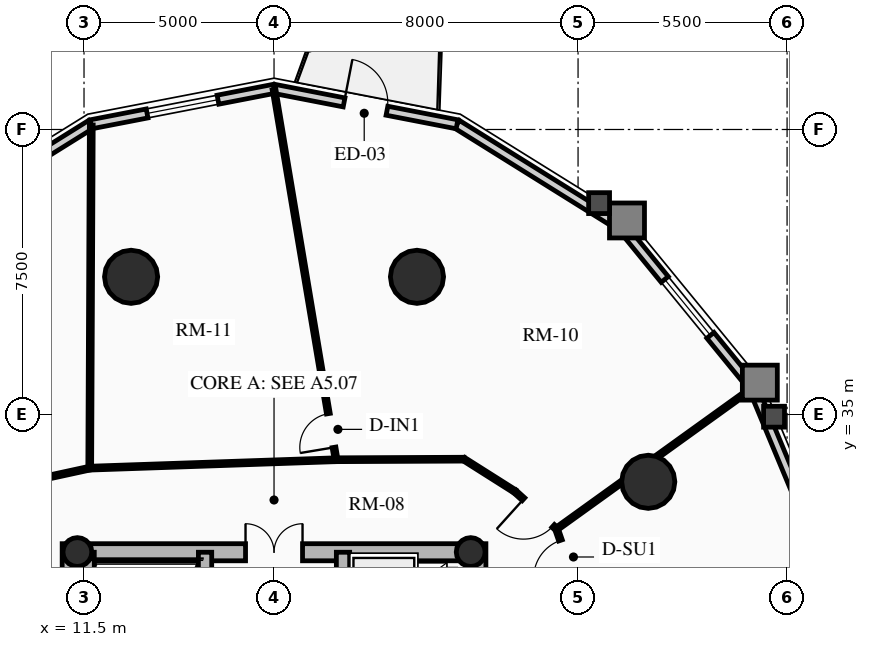
"""IFC4 building model, lengths in metres.
Left out: names, types, materials, properties, quantities, classifications, styles, units other than length and angle.
Written with IfcOpenShell. Run it as: python <this file> out.ifc"""

import sys

from ifc_helpers import new_model, si_unit, direction, frame, frame_2d, origin, origin_2d, place, context, subcontext, project, spatial, rectangle, circle, hollow_circle, extrude, source, transform, mapped, element, fill, save


model = new_model("IFC4")
c1 = context("Model", 3, precision=1e-05, world=origin(), true_north=direction((0.0, 1.0)))
c2 = subcontext(c1, "Body", "Model", "MODEL_VIEW")
j1 = project(units=[si_unit("LENGTHUNIT", "METRE"), si_unit("PLANEANGLEUNIT", "RADIAN")], contexts=[c1])
p1 = place(None, origin())
s1 = spatial("IfcSite", under=j1, at=p1, CompositionType="ELEMENT")
p2 = place(p1, origin())
s2 = spatial("IfcBuilding", under=s1, at=p2, CompositionType="ELEMENT")
p3 = place(p2, frame((0.0, 0.0, 102.16)))
s3 = spatial("IfcBuildingStorey", under=s2, at=p3, CompositionType="ELEMENT", Elevation=102.16)
for number, where, z_axis, x_axis in (
    (1, (11.15, 17.4, 0.0), (0.0, 0.0, 1.0), (0.0, 1.0, 0.0)),
    (2, (21.85, 17.4, 0.0), (0.0, 0.0, 1.0), (0.0, 1.0, 0.0)),
):
    element("IfcWall", number, at=place(p3, frame(where, z_axis=z_axis, x_axis=x_axis)), inside=s3, PredefinedType="SHEAR", context=c2, shape_type="SweptSolid", body=[
        extrude(rectangle(XDim=14.2, YDim=0.45, at=frame_2d((7.1, 0.0))), origin(), (0.0, 0.0, 1.0), 2.91),
    ])
p4 = place(p3, frame((11.15, 31.375, 0.0), z_axis=(0.0, 0.0, 1.0), x_axis=(1.0, 0.0, 0.0)))
e3 = element("IfcWall", 3, at=p4, inside=s3, PredefinedType="SHEAR", context=c2, shape_type="SweptSolid", body=[
    extrude(rectangle(XDim=10.7, YDim=0.45, at=frame_2d((5.35, 0.0))), origin(), (0.0, 0.0, 1.0), 2.91),
])
m1 = source(origin(), c2, "Body", "SweptSolid", [
    extrude(rectangle(XDim=1.5, YDim=2.02, at=frame_2d((0.75, 1.01))), frame((0.0, 0.235, 0.0), z_axis=(0.0, -1.0, 0.0), x_axis=(1.0, 0.0, 0.0)), (0.0, 0.0, 1.0), 0.47),
])
p5 = place(p4, frame((4.6, 0.0, 0.0)))
e4 = element("IfcOpeningElement", 4, at=p5, cuts=e3, PredefinedType="OPENING", context=c2, shape_type="MappedRepresentation", body=[
    mapped(m1, transform((0.0, 0.0, 0.0), x_axis=(1.0, 0.0, 0.0), y_axis=(0.0, 1.0, 0.0), z_axis=(0.0, 0.0, 1.0), scale=1.0)),
])
p6 = place(p3, frame((14.685, 17.625, 0.0), z_axis=(0.0, 0.0, 1.0), x_axis=(0.0, 1.0, 0.0)))
e5 = element("IfcWall", 5, at=p6, inside=s3, PredefinedType="SHEAR", context=c2, shape_type="SweptSolid", body=[
    extrude(rectangle(XDim=13.75, YDim=0.35, at=frame_2d((6.875, 0.0))), origin(), (0.0, 0.0, 1.0), 2.91),
])
m2 = source(origin(), c2, "Body", "SweptSolid", [
    extrude(rectangle(XDim=1.1, YDim=2.015, at=frame_2d((0.55, 1.007))), frame((0.0, 0.185, 0.0), z_axis=(0.0, -1.0, 0.0), x_axis=(1.0, 0.0, 0.0)), (0.0, 0.0, 1.0), 0.37),
])
p7 = place(p6, frame((4.875, 0.0, 0.0)))
e6 = element("IfcOpeningElement", 6, at=p7, cuts=e5, PredefinedType="OPENING", context=c2, shape_type="MappedRepresentation", body=[
    mapped(m2, transform((0.0, 0.0, 0.0), x_axis=(1.0, 0.0, 0.0), y_axis=(0.0, 1.0, 0.0), z_axis=(0.0, 0.0, 1.0), scale=1.0)),
])
m3 = source(origin(), c2, "Body", "SweptSolid", [
    extrude(rectangle(XDim=1.15, YDim=2.02, at=frame_2d((0.575, 1.01))), frame((0.0, 0.185, 0.0), z_axis=(0.0, -1.0, 0.0), x_axis=(1.0, 0.0, 0.0)), (0.0, 0.0, 1.0), 0.37),
])
p8 = place(p6, frame((7.295, 0.0, 0.0)))
e7 = element("IfcOpeningElement", 7, at=p8, cuts=e5, PredefinedType="OPENING", context=c2, shape_type="MappedRepresentation", body=[
    mapped(m3, transform((0.0, 0.0, 0.0), x_axis=(1.0, 0.0, 0.0), y_axis=(0.0, 1.0, 0.0), z_axis=(0.0, 0.0, 1.0), scale=1.0)),
])
p9 = place(p3, frame((18.315, 17.625, 0.0), z_axis=(0.0, 0.0, 1.0), x_axis=(0.0, 1.0, 0.0)))
e8 = element("IfcWall", 8, at=p9, inside=s3, PredefinedType="SHEAR", context=c2, shape_type="SweptSolid", body=[
    extrude(rectangle(XDim=13.75, YDim=0.35, at=frame_2d((6.875, 0.0))), origin(), (0.0, 0.0, 1.0), 2.91),
])
p10 = place(p9, frame((10.0, 0.0, 0.0)))
e9 = element("IfcOpeningElement", 9, at=p10, cuts=e8, PredefinedType="OPENING", context=c2, shape_type="MappedRepresentation", body=[
    mapped(m2, transform((0.0, 0.0, 0.0), x_axis=(1.0, 0.0, 0.0), y_axis=(0.0, 1.0, 0.0), z_axis=(0.0, 0.0, 1.0), scale=1.0)),
])
p11 = place(p9, frame((12.0, 0.0, 0.0)))
e10 = element("IfcOpeningElement", 10, at=p11, cuts=e8, PredefinedType="OPENING", context=c2, shape_type="MappedRepresentation", body=[
    mapped(m2, transform((0.0, 0.0, 0.0), x_axis=(1.0, 0.0, 0.0), y_axis=(0.0, 1.0, 0.0), z_axis=(0.0, 0.0, 1.0), scale=1.0)),
])
p12 = place(p9, frame((5.305, 0.0, 0.0)))
e11 = element("IfcOpeningElement", 11, at=p12, cuts=e8, PredefinedType="OPENING", context=c2, shape_type="MappedRepresentation", body=[
    mapped(m3, transform((0.0, 0.0, 0.0), x_axis=(1.0, 0.0, 0.0), y_axis=(0.0, 1.0, 0.0), z_axis=(0.0, 0.0, 1.0), scale=1.0)),
])
p13 = place(p3, frame((11.595, 24.655, 0.0), z_axis=(0.0, 0.0, 1.0), x_axis=(0.0, 1.0, 0.0)))
e12 = element("IfcWall", 12, at=p13, inside=s3, PredefinedType="SHEAR", context=c2, shape_type="SweptSolid", body=[
    extrude(rectangle(XDim=6.72, YDim=0.35, at=frame_2d((3.36, 0.0))), origin(), (0.0, 0.0, 1.0), 2.91),
])
for number, where, z_axis, x_axis in (
    (13, (11.325, 31.38, 0.0), (0.0, 0.0, 1.0), (1.0, 0.0, 0.0)),
    (14, (21.675, 31.38, 0.0), (0.0, 0.0, 1.0), (1.0, 0.0, 0.0)),
):
    element("IfcColumn", number, at=place(p3, frame(where, z_axis=z_axis, x_axis=x_axis)), inside=s3, PredefinedType="COLUMN", context=c2, shape_type="SweptSolid", body=[
        extrude(hollow_circle(Radius=0.38, WallThickness=0.032, at=origin_2d()), origin(), (0.0, 0.0, 1.0), 2.91),
    ])
for number, where, z_axis, x_axis in (
    (15, (26.347, 33.229, 0.0), (0.0, 0.0, 1.0), (1.0, 0.0, 0.0)),
    (16, (20.261, 38.623, 0.0), (0.0, 0.0, 1.0), (1.0, 0.0, 0.0)),
    (17, (12.739, 38.623, 0.0), (0.0, 0.0, 1.0), (1.0, 0.0, 0.0)),
):
    element("IfcColumn", number, at=place(p3, frame(where, z_axis=z_axis, x_axis=x_axis)), inside=s3, PredefinedType="USERDEFINED", context=c2, shape_type="SweptSolid", body=[
        extrude(circle(Radius=0.7, at=origin_2d()), origin(), (0.0, 0.0, 1.0), 2.91),
    ])
p14 = place(p3, frame((29.105, 35.709, 0.0), z_axis=(0.0, 0.0, 1.0), x_axis=(0.384344417632, -0.923189779317, 0.0)))
e18 = element("IfcWall", 18, at=p14, inside=s3, PredefinedType="SOLIDWALL", context=c2, shape_type="SweptSolid", body=[
    extrude(rectangle(XDim=5.758, YDim=0.24, at=frame_2d((2.879, 0.0))), origin(), (0.0, 0.0, 1.0), 2.179),
])
p15 = place(p3, frame((25.658, 39.928, 0.0), z_axis=(0.0, 0.0, 1.0), x_axis=(0.632700781152, -0.77439635945, 0.0)))
e19 = element("IfcWall", 19, at=p15, inside=s3, PredefinedType="SOLIDWALL", context=c2, shape_type="SweptSolid", body=[
    extrude(rectangle(XDim=5.448, YDim=0.24, at=frame_2d((2.724, 0.0))), origin(), (0.0, 0.0, 1.0), 2.179),
])
m4 = source(origin(), c2, "Body", "SweptSolid", [
    extrude(rectangle(XDim=1.9, YDim=1.35, at=frame_2d((0.95, 0.675))), frame((0.0, 0.13, 0.0), z_axis=(0.0, -1.0, 0.0), x_axis=(1.0, 0.0, 0.0)), (0.0, 0.0, 1.0), 0.26),
])
p16 = place(p15, frame((1.774, 0.0, 0.65)))
e20 = element("IfcOpeningElement", 20, at=p16, cuts=e19, PredefinedType="OPENING", context=c2, shape_type="MappedRepresentation", body=[
    mapped(m4, transform((0.0, 0.0, 0.0), x_axis=(1.0, 0.0, 0.0), y_axis=(0.0, 1.0, 0.0), z_axis=(0.0, 0.0, 1.0), scale=1.0)),
])
p17 = place(p3, frame((21.315, 42.637, 0.0), z_axis=(0.0, 0.0, 1.0), x_axis=(0.848520380187, -0.529162701263, 0.0)))
e21 = element("IfcWall", 21, at=p17, inside=s3, PredefinedType="SOLIDWALL", context=c2, shape_type="SweptSolid", body=[
    extrude(rectangle(XDim=5.119, YDim=0.24, at=frame_2d((2.56, 0.0))), origin(), (0.0, 0.0, 1.0), 2.179),
])
p18 = place(p3, frame((16.5, 43.57, 0.0), z_axis=(0.0, 0.0, 1.0), x_axis=(0.981723785992, -0.190311344954, 0.0)))
e22 = element("IfcWall", 22, at=p18, inside=s3, PredefinedType="SOLIDWALL", context=c2, shape_type="SweptSolid", body=[
    extrude(rectangle(XDim=4.904, YDim=0.24, at=frame_2d((2.452, 0.0))), origin(), (0.0, 0.0, 1.0), 2.179),
])
m5 = source(origin(), c2, "Body", "SweptSolid", [
    extrude(rectangle(XDim=1.15, YDim=2.005, at=frame_2d((0.575, 1.002))), frame((0.0, 0.13, 0.0), z_axis=(0.0, -1.0, 0.0), x_axis=(1.0, 0.0, 0.0)), (0.0, 0.0, 1.0), 0.26),
])
p19 = place(p18, frame((1.877, 0.0, 0.0)))
e23 = element("IfcOpeningElement", 23, at=p19, cuts=e22, PredefinedType="OPENING", context=c2, shape_type="MappedRepresentation", body=[
    mapped(m5, transform((0.0, 0.0, 0.0), x_axis=(1.0, 0.0, 0.0), y_axis=(0.0, 1.0, 0.0), z_axis=(0.0, 0.0, 1.0), scale=1.0)),
])
p20 = place(p3, frame((11.685, 42.637, 0.0), z_axis=(0.0, 0.0, 1.0), x_axis=(0.981723785992, 0.190311344954, 0.0)))
e24 = element("IfcWall", 24, at=p20, inside=s3, PredefinedType="SOLIDWALL", context=c2, shape_type="SweptSolid", body=[
    extrude(rectangle(XDim=4.904, YDim=0.24, at=frame_2d((2.452, 0.0))), origin(), (0.0, 0.0, 1.0), 2.179),
])
p21 = place(p20, frame((1.502, 0.0, 0.65)))
e25 = element("IfcOpeningElement", 25, at=p21, cuts=e24, PredefinedType="OPENING", context=c2, shape_type="MappedRepresentation", body=[
    mapped(m4, transform((0.0, 0.0, 0.0), x_axis=(1.0, 0.0, 0.0), y_axis=(0.0, 1.0, 0.0), z_axis=(0.0, 0.0, 1.0), scale=1.0)),
])
p22 = place(p3, frame((7.342, 39.928, 0.0), z_axis=(0.0, 0.0, 1.0), x_axis=(0.848520380187, 0.529162701263, 0.0)))
e26 = element("IfcWall", 26, at=p22, inside=s3, PredefinedType="SOLIDWALL", context=c2, shape_type="SweptSolid", body=[
    extrude(rectangle(XDim=5.119, YDim=0.24, at=frame_2d((2.56, 0.0))), origin(), (0.0, 0.0, 1.0), 2.179),
])
p23 = place(p3, frame((24.42, 30.582, 0.0), z_axis=(0.0, 0.0, 1.0), x_axis=(-0.327437665675, 0.944872782494, 0.0)))
e27 = element("IfcWall", 27, at=p23, inside=s3, PredefinedType="MOVABLE", context=c2, shape_type="SweptSolid", body=[
    extrude(rectangle(XDim=1.487, YDim=0.1, at=frame_2d((0.743, 0.0))), origin(), (0.0, 0.0, 1.0), 2.225),
])
m6 = source(origin(), c2, "Body", "SweptSolid", [
    extrude(rectangle(XDim=1.05, YDim=2.015, at=frame_2d((0.525, 1.007))), frame((0.0, 0.06, 0.0), z_axis=(0.0, -1.0, 0.0), x_axis=(1.0, 0.0, 0.0)), (0.0, 0.0, 1.0), 0.12),
])
p24 = place(p23, frame((0.12, 0.0, 0.0)))
e28 = element("IfcOpeningElement", 28, at=p24, cuts=e27, PredefinedType="OPENING", context=c2, shape_type="MappedRepresentation", body=[
    mapped(m6, transform((0.0, 0.0, 0.0), x_axis=(1.0, 0.0, 0.0), y_axis=(0.0, 1.0, 0.0), z_axis=(0.0, 0.0, 1.0), scale=1.0)),
])
p25 = place(p3, frame((23.933, 31.987, 0.0), z_axis=(0.0, 0.0, 1.0), x_axis=(-0.742471347264, 0.669877823556, 0.0)))
e29 = element("IfcWall", 29, at=p25, inside=s3, PredefinedType="MOVABLE", context=c2, shape_type="SweptSolid", body=[
    extrude(rectangle(XDim=1.476, YDim=0.1, at=frame_2d((0.738, 0.0))), origin(), (0.0, 0.0, 1.0), 2.225),
])
p26 = place(p25, frame((0.12, 0.0, 0.0)))
e30 = element("IfcOpeningElement", 30, at=p26, cuts=e29, PredefinedType="OPENING", context=c2, shape_type="MappedRepresentation", body=[
    mapped(m6, transform((0.0, 0.0, 0.0), x_axis=(1.0, 0.0, 0.0), y_axis=(0.0, 1.0, 0.0), z_axis=(0.0, 0.0, 1.0), scale=1.0)),
])
p27 = place(p3, frame((22.837, 32.976, 0.0), z_axis=(0.0, 0.0, 1.0), x_axis=(-0.844976677144, 0.534803155454, 0.0)))
e31 = element("IfcWall", 31, at=p27, inside=s3, PredefinedType="MOVABLE", context=c2, shape_type="SweptSolid", body=[
    extrude(rectangle(XDim=1.587, YDim=0.1, at=frame_2d((0.793, 0.0))), origin(), (0.0, 0.0, 1.0), 2.225),
])
p28 = place(p3, frame((21.496, 33.824, 0.0), z_axis=(0.0, 0.0, 1.0), x_axis=(-0.999990516754, -0.004355043261, 0.0)))
e32 = element("IfcWall", 32, at=p28, inside=s3, PredefinedType="MOVABLE", context=c2, shape_type="SweptSolid", body=[
    extrude(rectangle(XDim=3.364, YDim=0.1, at=frame_2d((1.682, 0.0))), origin(), (0.0, 0.0, 1.0), 2.225),
])
p29 = place(p3, frame((18.133, 33.81, 0.0), z_axis=(0.0, 0.0, 1.0), x_axis=(-0.999415793323, -0.03417706916, 0.0)))
e33 = element("IfcWall", 33, at=p29, inside=s3, PredefinedType="MOVABLE", context=c2, shape_type="SweptSolid", body=[
    extrude(rectangle(XDim=6.486, YDim=0.1, at=frame_2d((3.243, 0.0))), origin(), (0.0, 0.0, 1.0), 2.225),
])
p30 = place(p3, frame((11.65, 33.588, 0.0), z_axis=(0.0, 0.0, 1.0), x_axis=(-0.977141987047, -0.212587716366, 0.0)))
e34 = element("IfcWall", 34, at=p30, inside=s3, PredefinedType="MOVABLE", context=c2, shape_type="SweptSolid", body=[
    extrude(rectangle(XDim=1.924, YDim=0.1, at=frame_2d((0.962, 0.0))), origin(), (0.0, 0.0, 1.0), 2.225),
])
p31 = place(p3, frame((23.933, 31.987, 0.0), z_axis=(0.0, 0.0, 1.0), x_axis=(0.811642946178, 0.584153856377, 0.0)))
e35 = element("IfcWall", 35, at=p31, inside=s3, PredefinedType="MOVABLE", context=c2, shape_type="SweptSolid", body=[
    extrude(rectangle(XDim=6.352, YDim=0.1, at=frame_2d((3.176, 0.0))), origin(), (0.0, 0.0, 1.0), 2.179),
])
p32 = place(p3, frame((11.65, 33.588, 0.0), z_axis=(0.0, 0.0, 1.0), x_axis=(0.004542212376, 0.9999896841, 0.0)))
e36 = element("IfcWall", 36, at=p32, inside=s3, PredefinedType="MOVABLE", context=c2, shape_type="SweptSolid", body=[
    extrude(rectangle(XDim=9.03, YDim=0.1, at=frame_2d((4.515, 0.0))), origin(), (0.0, 0.0, 1.0), 2.179),
])
p33 = place(p3, frame((18.133, 33.81, 0.0), z_axis=(0.0, 0.0, 1.0), x_axis=(-0.165324898919, 0.98623915852, 0.0)))
e37 = element("IfcWall", 37, at=p33, inside=s3, PredefinedType="MOVABLE", context=c2, shape_type="SweptSolid", body=[
    extrude(rectangle(XDim=9.876, YDim=0.1, at=frame_2d((4.938, 0.0))), origin(), (0.0, 0.0, 1.0), 2.179),
])
m7 = source(origin(), c2, "Body", "SweptSolid", [
    extrude(rectangle(XDim=0.9, YDim=2.005, at=frame_2d((0.45, 1.002))), frame((0.0, 0.06, 0.0), z_axis=(0.0, -1.0, 0.0), x_axis=(1.0, 0.0, 0.0)), (0.0, 0.0, 1.0), 0.12),
])
p34 = place(p33, frame((0.33, 0.0, 0.0)))
e38 = element("IfcOpeningElement", 38, at=p34, cuts=e37, PredefinedType="OPENING", context=c2, shape_type="MappedRepresentation", body=[
    mapped(m7, transform((0.0, 0.0, 0.0), x_axis=(1.0, 0.0, 0.0), y_axis=(0.0, 1.0, 0.0), z_axis=(0.0, 0.0, 1.0), scale=1.0)),
])
m8 = source(origin(), c2, "Body", "SweptSolid", [
    extrude(rectangle(XDim=1.9, YDim=1.35, at=frame_2d((0.95, 0.675))), frame((0.0, 0.03, 0.0), z_axis=(0.0, -1.0, 0.0), x_axis=(1.0, 0.0, 0.0)), (0.0, 0.0, 1.0), 0.06),
])
p35 = place(p16, origin())
e39 = element("IfcWindow", 39, at=p35, inside=s3, PartitioningType="DOUBLE_PANEL_VERTICAL", PredefinedType="WINDOW", context=c2, shape_type="MappedRepresentation", body=[
    mapped(m8, transform((0.0, 0.0, 0.0), x_axis=(1.0, 0.0, 0.0), y_axis=(0.0, 1.0, 0.0), z_axis=(0.0, 0.0, 1.0), scale=1.0)),
])
fill(e20, e39)
m9 = source(origin(), c2, "Body", "SweptSolid", [
    extrude(rectangle(XDim=1.15, YDim=2.005, at=frame_2d((0.575, 1.002))), frame((0.0, 0.025, 0.0), z_axis=(0.0, -1.0, 0.0), x_axis=(1.0, 0.0, 0.0)), (0.0, 0.0, 1.0), 0.05),
])
p36 = place(p19, origin())
e40 = element("IfcDoor", 40, at=p36, inside=s3, OperationType="SINGLE_SWING_LEFT", PredefinedType="DOOR", context=c2, shape_type="MappedRepresentation", body=[
    mapped(m9, transform((0.0, 0.0, 0.0), x_axis=(1.0, 0.0, 0.0), y_axis=(0.0, 1.0, 0.0), z_axis=(0.0, 0.0, 1.0), scale=1.0)),
])
fill(e23, e40)
p37 = place(p21, origin())
e41 = element("IfcWindow", 41, at=p37, inside=s3, PartitioningType="DOUBLE_PANEL_VERTICAL", PredefinedType="WINDOW", context=c2, shape_type="MappedRepresentation", body=[
    mapped(m8, transform((0.0, 0.0, 0.0), x_axis=(1.0, 0.0, 0.0), y_axis=(0.0, 1.0, 0.0), z_axis=(0.0, 0.0, 1.0), scale=1.0)),
])
fill(e25, e41)
m10 = source(origin(), c2, "Body", "SweptSolid", [
    extrude(rectangle(XDim=1.5, YDim=2.02, at=frame_2d((0.75, 1.01))), frame((0.0, 0.025, 0.0), z_axis=(0.0, -1.0, 0.0), x_axis=(1.0, 0.0, 0.0)), (0.0, 0.0, 1.0), 0.05),
])
p38 = place(p5, origin())
e42 = element("IfcDoor", 42, at=p38, inside=s3, OperationType="DOUBLE_DOOR_SINGLE_SWING", PredefinedType="DOOR", context=c2, shape_type="MappedRepresentation", body=[
    mapped(m10, transform((0.0, 0.0, 0.0), x_axis=(1.0, 0.0, 0.0), y_axis=(0.0, 1.0, 0.0), z_axis=(0.0, 0.0, 1.0), scale=1.0)),
])
fill(e4, e42)
m11 = source(origin(), c2, "Body", "SweptSolid", [
    extrude(rectangle(XDim=1.05, YDim=2.015, at=frame_2d((0.525, 1.007))), frame((0.0, 0.025, 0.0), z_axis=(0.0, -1.0, 0.0), x_axis=(1.0, 0.0, 0.0)), (0.0, 0.0, 1.0), 0.05),
])
p39 = place(p24, origin())
e43 = element("IfcDoor", 43, at=p39, inside=s3, OperationType="SINGLE_SWING_LEFT", PredefinedType="DOOR", context=c2, shape_type="MappedRepresentation", body=[
    mapped(m11, transform((0.0, 0.0, 0.0), x_axis=(1.0, 0.0, 0.0), y_axis=(0.0, 1.0, 0.0), z_axis=(0.0, 0.0, 1.0), scale=1.0)),
])
fill(e28, e43)
p40 = place(p26, origin())
e44 = element("IfcDoor", 44, at=p40, inside=s3, OperationType="SINGLE_SWING_RIGHT", PredefinedType="DOOR", context=c2, shape_type="MappedRepresentation", body=[
    mapped(m11, transform((0.0, 0.0, 0.0), x_axis=(1.0, 0.0, 0.0), y_axis=(0.0, 1.0, 0.0), z_axis=(0.0, 0.0, 1.0), scale=1.0)),
])
fill(e30, e44)
m12 = source(origin(), c2, "Body", "SweptSolid", [
    extrude(rectangle(XDim=0.9, YDim=2.005, at=frame_2d((0.45, 1.002))), frame((0.0, 0.025, 0.0), z_axis=(0.0, -1.0, 0.0), x_axis=(1.0, 0.0, 0.0)), (0.0, 0.0, 1.0), 0.05),
])
p41 = place(p34, origin())
e45 = element("IfcDoor", 45, at=p41, inside=s3, OperationType="SINGLE_SWING_LEFT", PredefinedType="DOOR", context=c2, shape_type="MappedRepresentation", body=[
    mapped(m12, transform((0.0, 0.0, 0.0), x_axis=(1.0, 0.0, 0.0), y_axis=(0.0, 1.0, 0.0), z_axis=(0.0, 0.0, 1.0), scale=1.0)),
])
fill(e38, e45)
save(model, sys.argv[1])
